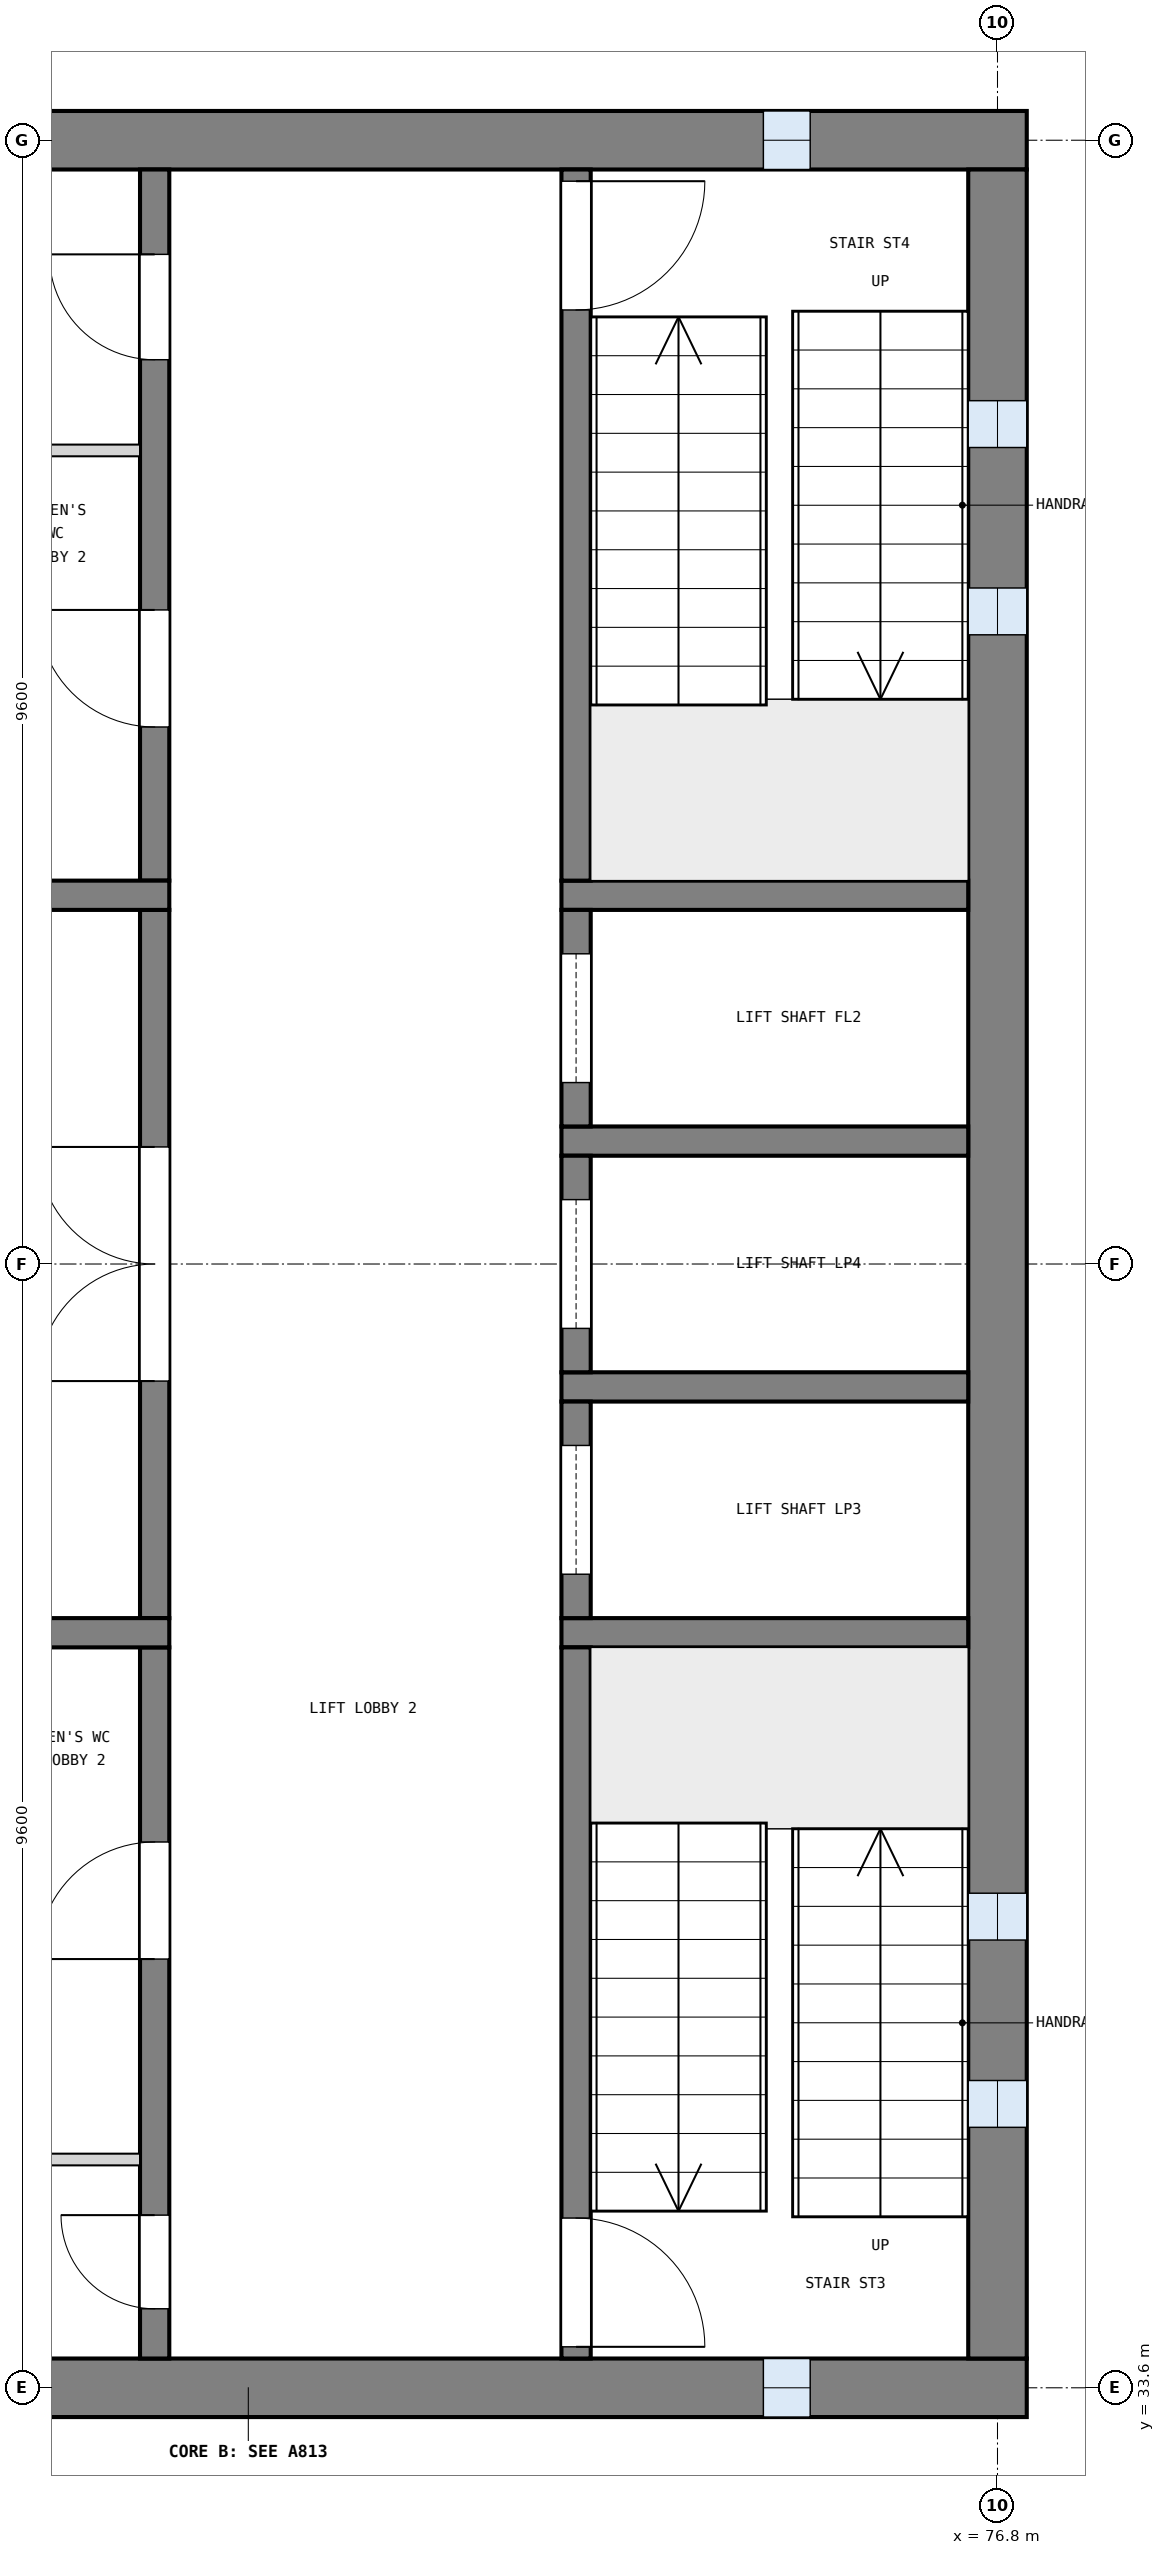
"""IFC4 building model, lengths in metres.
Left out: names, types, materials, properties, quantities, classifications, styles, units other than length and angle.
Written with IfcOpenShell. Run it as: python <this file> out.ifc"""

import sys

from ifc_helpers import new_model, si_unit, direction, frame, frame_2d, origin, place, context, subcontext, project, spatial, rectangle, extrude, element, fill, save


model = new_model("IFC4")
c1 = context("Model", 3, precision=1e-05, world=origin(), true_north=direction((0.0, 1.0)))
c2 = subcontext(c1, "Body", "Model", "MODEL_VIEW")
j1 = project(units=[si_unit("LENGTHUNIT", "METRE"), si_unit("PLANEANGLEUNIT", "RADIAN")], contexts=[c1])
p1 = place(None, origin())
s1 = spatial("IfcSite", under=j1, at=p1, CompositionType="ELEMENT")
p2 = place(p1, origin())
s2 = spatial("IfcBuilding", under=s1, at=p2, CompositionType="ELEMENT")
p3 = place(p2, frame((0.0, 0.0, 44.4)))
s3 = spatial("IfcBuildingStorey", under=s2, at=p3, CompositionType="ELEMENT", Elevation=44.4)
p4 = place(p3, frame((63.75, 52.8, 0.0), z_axis=(0.0, 0.0, 1.0), x_axis=(1.0, 0.0, 0.0)))
e1 = element("IfcWall", 1, at=p4, inside=s3, PredefinedType="SHEAR", context=c2, shape_type="SweptSolid", body=[
    extrude(rectangle(XDim=13.3, YDim=0.5, at=frame_2d((6.65, 0.0))), origin(), (0.0, 0.0, 1.0), 3.9),
])
p5 = place(p4, frame((11.05, 0.0, 1.0)))
e2 = element("IfcOpeningElement", 2, at=p5, cuts=e1, PredefinedType="OPENING", context=c2, shape_type="SweptSolid", body=[
    extrude(rectangle(XDim=0.4, YDim=2.0, at=frame_2d((0.2, 1.0))), frame((0.0, 0.26, 0.0), z_axis=(0.0, -1.0, 0.0), x_axis=(1.0, 0.0, 0.0)), (0.0, 0.0, 1.0), 0.52),
])
p6 = place(p3, frame((63.75, 33.6, 0.0), z_axis=(0.0, 0.0, 1.0), x_axis=(1.0, 0.0, 0.0)))
e3 = element("IfcWall", 3, at=p6, inside=s3, PredefinedType="SHEAR", context=c2, shape_type="SweptSolid", body=[
    extrude(rectangle(XDim=13.3, YDim=0.5, at=frame_2d((6.65, 0.0))), origin(), (0.0, 0.0, 1.0), 3.9),
])
p7 = place(p6, frame((11.05, 0.0, 1.0)))
e4 = element("IfcOpeningElement", 4, at=p7, cuts=e3, PredefinedType="OPENING", context=c2, shape_type="SweptSolid", body=[
    extrude(rectangle(XDim=0.4, YDim=2.0, at=frame_2d((0.2, 1.0))), frame((0.0, 0.26, 0.0), z_axis=(0.0, -1.0, 0.0), x_axis=(1.0, 0.0, 0.0)), (0.0, 0.0, 1.0), 0.52),
])
p8 = place(p3, frame((76.8, 33.85, 0.0), z_axis=(0.0, 0.0, 1.0), x_axis=(0.0, 1.0, 0.0)))
e5 = element("IfcWall", 5, at=p8, inside=s3, PredefinedType="SHEAR", context=c2, shape_type="SweptSolid", body=[
    extrude(rectangle(XDim=18.7, YDim=0.5, at=frame_2d((9.35, 0.0))), origin(), (0.0, 0.0, 1.0), 3.9),
])
p9 = place(p8, frame((1.975, 0.0, 1.0)))
e6 = element("IfcOpeningElement", 6, at=p9, cuts=e5, PredefinedType="OPENING", context=c2, shape_type="SweptSolid", body=[
    extrude(rectangle(XDim=0.4, YDim=2.0, at=frame_2d((0.2, 1.0))), frame((0.0, 0.26, 0.0), z_axis=(0.0, -1.0, 0.0), x_axis=(1.0, 0.0, 0.0)), (0.0, 0.0, 1.0), 0.52),
])
p10 = place(p8, frame((3.575, 0.0, 1.0)))
e7 = element("IfcOpeningElement", 7, at=p10, cuts=e5, PredefinedType="OPENING", context=c2, shape_type="SweptSolid", body=[
    extrude(rectangle(XDim=0.4, YDim=2.0, at=frame_2d((0.2, 1.0))), frame((0.0, 0.26, 0.0), z_axis=(0.0, -1.0, 0.0), x_axis=(1.0, 0.0, 0.0)), (0.0, 0.0, 1.0), 0.52),
])
p11 = place(p8, frame((14.725, 0.0, 1.0)))
e8 = element("IfcOpeningElement", 8, at=p11, cuts=e5, PredefinedType="OPENING", context=c2, shape_type="SweptSolid", body=[
    extrude(rectangle(XDim=0.4, YDim=2.0, at=frame_2d((0.2, 1.0))), frame((0.0, 0.26, 0.0), z_axis=(0.0, -1.0, 0.0), x_axis=(1.0, 0.0, 0.0)), (0.0, 0.0, 1.0), 0.52),
])
p12 = place(p8, frame((16.325, 0.0, 1.0)))
e9 = element("IfcOpeningElement", 9, at=p12, cuts=e5, PredefinedType="OPENING", context=c2, shape_type="SweptSolid", body=[
    extrude(rectangle(XDim=0.4, YDim=2.0, at=frame_2d((0.2, 1.0))), frame((0.0, 0.26, 0.0), z_axis=(0.0, -1.0, 0.0), x_axis=(1.0, 0.0, 0.0)), (0.0, 0.0, 1.0), 0.52),
])
for number, where, z_axis, x_axis in (
    (10, (76.55, 40.05, 0.0), (0.0, 0.0, 1.0), (-1.0, 0.0, 0.0)),
    (11, (76.55, 42.15, 0.0), (0.0, 0.0, 1.0), (-1.0, 0.0, 0.0)),
    (12, (76.55, 44.25, 0.0), (0.0, 0.0, 1.0), (-1.0, 0.0, 0.0)),
    (13, (76.55, 46.35, 0.0), (0.0, 0.0, 1.0), (-1.0, 0.0, 0.0)),
):
    element("IfcWall", number, at=place(p3, frame(where, z_axis=z_axis, x_axis=x_axis)), inside=s3, PredefinedType="SOLIDWALL", context=c2, shape_type="SweptSolid", body=[
        extrude(rectangle(XDim=3.475, YDim=0.25, at=frame_2d((1.738, 0.0))), origin(), (0.0, 0.0, 1.0), 3.6),
    ])
p13 = place(p3, frame((73.2, 33.85, 0.0), z_axis=(0.0, 0.0, 1.0), x_axis=(0.0, 1.0, 0.0)))
e14 = element("IfcWall", 14, at=p13, inside=s3, PredefinedType="SOLIDWALL", context=c2, shape_type="SweptSolid", body=[
    extrude(rectangle(XDim=6.075, YDim=0.25, at=frame_2d((3.038, 0.0))), origin(), (0.0, 0.0, 1.0), 3.6),
])
p14 = place(p13, frame((0.1, 0.0, 0.0)))
e15 = element("IfcOpeningElement", 15, at=p14, cuts=e14, PredefinedType="OPENING", context=c2, shape_type="SweptSolid", body=[
    extrude(rectangle(XDim=1.1, YDim=2.1, at=frame_2d((0.55, 1.05))), frame((0.0, 0.135, 0.0), z_axis=(0.0, -1.0, 0.0), x_axis=(1.0, 0.0, 0.0)), (0.0, 0.0, 1.0), 0.27),
])
p15 = place(p3, frame((73.2, 40.175, 0.0), z_axis=(0.0, 0.0, 1.0), x_axis=(0.0, 1.0, 0.0)))
e16 = element("IfcWall", 16, at=p15, inside=s3, PredefinedType="SOLIDWALL", context=c2, shape_type="SweptSolid", body=[
    extrude(rectangle(XDim=1.85, YDim=0.25, at=frame_2d((0.925, 0.0))), origin(), (0.0, 0.0, 1.0), 3.6),
])
p16 = place(p15, frame((0.375, 0.0, 0.0)))
e17 = element("IfcOpeningElement", 17, at=p16, cuts=e16, PredefinedType="OPENING", context=c2, shape_type="SweptSolid", body=[
    extrude(rectangle(XDim=1.1, YDim=2.1, at=frame_2d((0.55, 1.05))), frame((0.0, 0.135, 0.0), z_axis=(0.0, -1.0, 0.0), x_axis=(1.0, 0.0, 0.0)), (0.0, 0.0, 1.0), 0.27),
])
p17 = place(p3, frame((73.2, 42.275, 0.0), z_axis=(0.0, 0.0, 1.0), x_axis=(0.0, 1.0, 0.0)))
e18 = element("IfcWall", 18, at=p17, inside=s3, PredefinedType="SOLIDWALL", context=c2, shape_type="SweptSolid", body=[
    extrude(rectangle(XDim=1.85, YDim=0.25, at=frame_2d((0.925, 0.0))), origin(), (0.0, 0.0, 1.0), 3.6),
])
p18 = place(p17, frame((0.375, 0.0, 0.0)))
e19 = element("IfcOpeningElement", 19, at=p18, cuts=e18, PredefinedType="OPENING", context=c2, shape_type="SweptSolid", body=[
    extrude(rectangle(XDim=1.1, YDim=2.1, at=frame_2d((0.55, 1.05))), frame((0.0, 0.135, 0.0), z_axis=(0.0, -1.0, 0.0), x_axis=(1.0, 0.0, 0.0)), (0.0, 0.0, 1.0), 0.27),
])
p19 = place(p3, frame((73.2, 44.375, 0.0), z_axis=(0.0, 0.0, 1.0), x_axis=(0.0, 1.0, 0.0)))
e20 = element("IfcWall", 20, at=p19, inside=s3, PredefinedType="SOLIDWALL", context=c2, shape_type="SweptSolid", body=[
    extrude(rectangle(XDim=1.85, YDim=0.25, at=frame_2d((0.925, 0.0))), origin(), (0.0, 0.0, 1.0), 3.6),
])
p20 = place(p19, frame((0.375, 0.0, 0.0)))
e21 = element("IfcOpeningElement", 21, at=p20, cuts=e20, PredefinedType="OPENING", context=c2, shape_type="SweptSolid", body=[
    extrude(rectangle(XDim=1.1, YDim=2.1, at=frame_2d((0.55, 1.05))), frame((0.0, 0.135, 0.0), z_axis=(0.0, -1.0, 0.0), x_axis=(1.0, 0.0, 0.0)), (0.0, 0.0, 1.0), 0.27),
])
p21 = place(p3, frame((73.2, 46.475, 0.0), z_axis=(0.0, 0.0, 1.0), x_axis=(0.0, 1.0, 0.0)))
e22 = element("IfcWall", 22, at=p21, inside=s3, PredefinedType="SOLIDWALL", context=c2, shape_type="SweptSolid", body=[
    extrude(rectangle(XDim=6.075, YDim=0.25, at=frame_2d((3.038, 0.0))), origin(), (0.0, 0.0, 1.0), 3.6),
])
p22 = place(p21, frame((4.875, 0.0, 0.0)))
e23 = element("IfcOpeningElement", 23, at=p22, cuts=e22, PredefinedType="OPENING", context=c2, shape_type="SweptSolid", body=[
    extrude(rectangle(XDim=1.1, YDim=2.1, at=frame_2d((0.55, 1.05))), frame((0.0, 0.135, 0.0), z_axis=(0.0, -1.0, 0.0), x_axis=(1.0, 0.0, 0.0)), (0.0, 0.0, 1.0), 0.27),
])
p23 = place(p3, frame((69.6, 33.85, 0.0), z_axis=(0.0, 0.0, 1.0), x_axis=(0.0, 1.0, 0.0)))
e24 = element("IfcWall", 24, at=p23, inside=s3, PredefinedType="SOLIDWALL", context=c2, shape_type="SweptSolid", body=[
    extrude(rectangle(XDim=6.075, YDim=0.25, at=frame_2d((3.038, 0.0))), origin(), (0.0, 0.0, 1.0), 3.6),
])
p24 = place(p23, frame((0.425, 0.0, 0.0)))
e25 = element("IfcOpeningElement", 25, at=p24, cuts=e24, PredefinedType="OPENING", context=c2, shape_type="SweptSolid", body=[
    extrude(rectangle(XDim=0.8, YDim=2.1, at=frame_2d((0.4, 1.05))), frame((0.0, 0.135, 0.0), z_axis=(0.0, -1.0, 0.0), x_axis=(1.0, 0.0, 0.0)), (0.0, 0.0, 1.0), 0.27),
])
p25 = place(p23, frame((3.413, 0.0, 0.0)))
e26 = element("IfcOpeningElement", 26, at=p25, cuts=e24, PredefinedType="OPENING", context=c2, shape_type="SweptSolid", body=[
    extrude(rectangle(XDim=1.0, YDim=2.1, at=frame_2d((0.5, 1.05))), frame((0.0, 0.135, 0.0), z_axis=(0.0, -1.0, 0.0), x_axis=(1.0, 0.0, 0.0)), (0.0, 0.0, 1.0), 0.27),
])
p26 = place(p3, frame((69.6, 40.175, 0.0), z_axis=(0.0, 0.0, 1.0), x_axis=(0.0, 1.0, 0.0)))
e27 = element("IfcWall", 27, at=p26, inside=s3, PredefinedType="SOLIDWALL", context=c2, shape_type="SweptSolid", body=[
    extrude(rectangle(XDim=6.05, YDim=0.25, at=frame_2d((3.025, 0.0))), origin(), (0.0, 0.0, 1.0), 3.6),
])
p27 = place(p26, frame((2.025, 0.0, 0.0)))
e28 = element("IfcOpeningElement", 28, at=p27, cuts=e27, PredefinedType="OPENING", context=c2, shape_type="SweptSolid", body=[
    extrude(rectangle(XDim=2.0, YDim=2.1, at=frame_2d((1.0, 1.05))), frame((0.0, 0.135, 0.0), z_axis=(0.0, -1.0, 0.0), x_axis=(1.0, 0.0, 0.0)), (0.0, 0.0, 1.0), 0.27),
])
p28 = place(p3, frame((69.6, 46.475, 0.0), z_axis=(0.0, 0.0, 1.0), x_axis=(0.0, 1.0, 0.0)))
e29 = element("IfcWall", 29, at=p28, inside=s3, PredefinedType="SOLIDWALL", context=c2, shape_type="SweptSolid", body=[
    extrude(rectangle(XDim=6.075, YDim=0.25, at=frame_2d((3.038, 0.0))), origin(), (0.0, 0.0, 1.0), 3.6),
])
p29 = place(p28, frame((1.312, 0.0, 0.0)))
e30 = element("IfcOpeningElement", 30, at=p29, cuts=e29, PredefinedType="OPENING", context=c2, shape_type="SweptSolid", body=[
    extrude(rectangle(XDim=1.0, YDim=2.1, at=frame_2d((0.5, 1.05))), frame((0.0, 0.135, 0.0), z_axis=(0.0, -1.0, 0.0), x_axis=(1.0, 0.0, 0.0)), (0.0, 0.0, 1.0), 0.27),
])
p30 = place(p28, frame((4.45, 0.0, 0.0)))
e31 = element("IfcOpeningElement", 31, at=p30, cuts=e29, PredefinedType="OPENING", context=c2, shape_type="SweptSolid", body=[
    extrude(rectangle(XDim=0.9, YDim=2.1, at=frame_2d((0.45, 1.05))), frame((0.0, 0.135, 0.0), z_axis=(0.0, -1.0, 0.0), x_axis=(1.0, 0.0, 0.0)), (0.0, 0.0, 1.0), 0.27),
])
for number, where, z_axis, x_axis in (
    (32, (69.725, 40.05, 0.0), (0.0, 0.0, 1.0), (-1.0, 0.0, 0.0)),
    (33, (69.725, 46.35, 0.0), (0.0, 0.0, 1.0), (-1.0, 0.0, 0.0)),
):
    element("IfcWall", number, at=place(p3, frame(where, z_axis=z_axis, x_axis=x_axis)), inside=s3, PredefinedType="SOLIDWALL", context=c2, shape_type="SweptSolid", body=[
        extrude(rectangle(XDim=5.475, YDim=0.25, at=frame_2d((2.738, 0.0))), origin(), (0.0, 0.0, 1.0), 3.6),
    ])
for number, where, z_axis, x_axis in (
    (34, (69.475, 35.55, 0.0), (0.0, 0.0, 1.0), (-1.0, 0.0, 0.0)),
    (35, (69.475, 50.15, 0.0), (0.0, 0.0, 1.0), (-1.0, 0.0, 0.0)),
):
    element("IfcWall", number, at=place(p3, frame(where, z_axis=z_axis, x_axis=x_axis)), inside=s3, PredefinedType="PARTITIONING", context=c2, shape_type="SweptSolid", body=[
        extrude(rectangle(XDim=5.225, YDim=0.1, at=frame_2d((2.613, 0.0))), origin(), (0.0, 0.0, 1.0), 3.6),
    ])
p31 = place(p9, origin())
e36 = element("IfcWindow", 36, at=p31, inside=s3, PartitioningType="SINGLE_PANEL", PredefinedType="WINDOW", context=c2, shape_type="SweptSolid", body=[
    extrude(rectangle(XDim=0.4, YDim=2.0, at=frame_2d((0.2, 1.0))), frame((0.0, 0.03, 0.0), z_axis=(0.0, -1.0, 0.0), x_axis=(1.0, 0.0, 0.0)), (0.0, 0.0, 1.0), 0.06),
])
fill(e6, e36)
p32 = place(p10, origin())
e37 = element("IfcWindow", 37, at=p32, inside=s3, PartitioningType="SINGLE_PANEL", PredefinedType="WINDOW", context=c2, shape_type="SweptSolid", body=[
    extrude(rectangle(XDim=0.4, YDim=2.0, at=frame_2d((0.2, 1.0))), frame((0.0, 0.03, 0.0), z_axis=(0.0, -1.0, 0.0), x_axis=(1.0, 0.0, 0.0)), (0.0, 0.0, 1.0), 0.06),
])
fill(e7, e37)
p33 = place(p11, origin())
e38 = element("IfcWindow", 38, at=p33, inside=s3, PartitioningType="SINGLE_PANEL", PredefinedType="WINDOW", context=c2, shape_type="SweptSolid", body=[
    extrude(rectangle(XDim=0.4, YDim=2.0, at=frame_2d((0.2, 1.0))), frame((0.0, 0.03, 0.0), z_axis=(0.0, -1.0, 0.0), x_axis=(1.0, 0.0, 0.0)), (0.0, 0.0, 1.0), 0.06),
])
fill(e8, e38)
p34 = place(p12, origin())
e39 = element("IfcWindow", 39, at=p34, inside=s3, PartitioningType="SINGLE_PANEL", PredefinedType="WINDOW", context=c2, shape_type="SweptSolid", body=[
    extrude(rectangle(XDim=0.4, YDim=2.0, at=frame_2d((0.2, 1.0))), frame((0.0, 0.03, 0.0), z_axis=(0.0, -1.0, 0.0), x_axis=(1.0, 0.0, 0.0)), (0.0, 0.0, 1.0), 0.06),
])
fill(e9, e39)
p35 = place(p7, origin())
e40 = element("IfcWindow", 40, at=p35, inside=s3, PartitioningType="SINGLE_PANEL", PredefinedType="WINDOW", context=c2, shape_type="SweptSolid", body=[
    extrude(rectangle(XDim=0.4, YDim=2.0, at=frame_2d((0.2, 1.0))), frame((0.0, 0.03, 0.0), z_axis=(0.0, -1.0, 0.0), x_axis=(1.0, 0.0, 0.0)), (0.0, 0.0, 1.0), 0.06),
])
fill(e4, e40)
p36 = place(p5, origin())
e41 = element("IfcWindow", 41, at=p36, inside=s3, PartitioningType="SINGLE_PANEL", PredefinedType="WINDOW", context=c2, shape_type="SweptSolid", body=[
    extrude(rectangle(XDim=0.4, YDim=2.0, at=frame_2d((0.2, 1.0))), frame((0.0, 0.03, 0.0), z_axis=(0.0, -1.0, 0.0), x_axis=(1.0, 0.0, 0.0)), (0.0, 0.0, 1.0), 0.06),
])
fill(e2, e41)
p37 = place(p14, frame((1.1, 0.0, 0.0), z_axis=(0.0, 0.0, 1.0), x_axis=(-1.0, 0.0, 0.0)))
e42 = element("IfcDoor", 42, at=p37, inside=s3, OperationType="SINGLE_SWING_RIGHT", PredefinedType="DOOR", context=c2, shape_type="SweptSolid", body=[
    extrude(rectangle(XDim=1.1, YDim=2.1, at=frame_2d((0.55, 1.05))), frame((0.0, 0.025, 0.0), z_axis=(0.0, -1.0, 0.0), x_axis=(1.0, 0.0, 0.0)), (0.0, 0.0, 1.0), 0.05),
])
fill(e15, e42)
p38 = place(p22, frame((1.1, 0.0, 0.0), z_axis=(0.0, 0.0, 1.0), x_axis=(-1.0, 0.0, 0.0)))
e43 = element("IfcDoor", 43, at=p38, inside=s3, OperationType="SINGLE_SWING_LEFT", PredefinedType="DOOR", context=c2, shape_type="SweptSolid", body=[
    extrude(rectangle(XDim=1.1, YDim=2.1, at=frame_2d((0.55, 1.05))), frame((0.0, 0.025, 0.0), z_axis=(0.0, -1.0, 0.0), x_axis=(1.0, 0.0, 0.0)), (0.0, 0.0, 1.0), 0.05),
])
fill(e23, e43)
p39 = place(p16, origin())
e44 = element("IfcDoor", 44, at=p39, inside=s3, OperationType="SLIDING_TO_LEFT", PredefinedType="DOOR", context=c2, shape_type="SweptSolid", body=[
    extrude(rectangle(XDim=1.1, YDim=2.1, at=frame_2d((0.55, 1.05))), frame((0.0, 0.025, 0.0), z_axis=(0.0, -1.0, 0.0), x_axis=(1.0, 0.0, 0.0)), (0.0, 0.0, 1.0), 0.05),
])
fill(e17, e44)
p40 = place(p18, origin())
e45 = element("IfcDoor", 45, at=p40, inside=s3, OperationType="SLIDING_TO_LEFT", PredefinedType="DOOR", context=c2, shape_type="SweptSolid", body=[
    extrude(rectangle(XDim=1.1, YDim=2.1, at=frame_2d((0.55, 1.05))), frame((0.0, 0.025, 0.0), z_axis=(0.0, -1.0, 0.0), x_axis=(1.0, 0.0, 0.0)), (0.0, 0.0, 1.0), 0.05),
])
fill(e19, e45)
p41 = place(p20, origin())
e46 = element("IfcDoor", 46, at=p41, inside=s3, OperationType="SLIDING_TO_LEFT", PredefinedType="DOOR", context=c2, shape_type="SweptSolid", body=[
    extrude(rectangle(XDim=1.1, YDim=2.1, at=frame_2d((0.55, 1.05))), frame((0.0, 0.025, 0.0), z_axis=(0.0, -1.0, 0.0), x_axis=(1.0, 0.0, 0.0)), (0.0, 0.0, 1.0), 0.05),
])
fill(e21, e46)
p42 = place(p27, origin())
e47 = element("IfcDoor", 47, at=p42, inside=s3, OperationType="DOUBLE_DOOR_SINGLE_SWING", PredefinedType="DOOR", context=c2, shape_type="SweptSolid", body=[
    extrude(rectangle(XDim=2.0, YDim=2.1, at=frame_2d((1.0, 1.05))), frame((0.0, 0.025, 0.0), z_axis=(0.0, -1.0, 0.0), x_axis=(1.0, 0.0, 0.0)), (0.0, 0.0, 1.0), 0.05),
])
fill(e28, e47)
p43 = place(p24, origin())
e48 = element("IfcDoor", 48, at=p43, inside=s3, OperationType="SINGLE_SWING_RIGHT", PredefinedType="DOOR", context=c2, shape_type="SweptSolid", body=[
    extrude(rectangle(XDim=0.8, YDim=2.1, at=frame_2d((0.4, 1.05))), frame((0.0, 0.025, 0.0), z_axis=(0.0, -1.0, 0.0), x_axis=(1.0, 0.0, 0.0)), (0.0, 0.0, 1.0), 0.05),
])
fill(e25, e48)
p44 = place(p25, origin())
e49 = element("IfcDoor", 49, at=p44, inside=s3, OperationType="SINGLE_SWING_LEFT", PredefinedType="DOOR", context=c2, shape_type="SweptSolid", body=[
    extrude(rectangle(XDim=1.0, YDim=2.1, at=frame_2d((0.5, 1.05))), frame((0.0, 0.025, 0.0), z_axis=(0.0, -1.0, 0.0), x_axis=(1.0, 0.0, 0.0)), (0.0, 0.0, 1.0), 0.05),
])
fill(e26, e49)
p45 = place(p29, origin())
e50 = element("IfcDoor", 50, at=p45, inside=s3, OperationType="SINGLE_SWING_RIGHT", PredefinedType="DOOR", context=c2, shape_type="SweptSolid", body=[
    extrude(rectangle(XDim=1.0, YDim=2.1, at=frame_2d((0.5, 1.05))), frame((0.0, 0.025, 0.0), z_axis=(0.0, -1.0, 0.0), x_axis=(1.0, 0.0, 0.0)), (0.0, 0.0, 1.0), 0.05),
])
fill(e30, e50)
p46 = place(p30, origin())
e51 = element("IfcDoor", 51, at=p46, inside=s3, OperationType="SINGLE_SWING_RIGHT", PredefinedType="DOOR", context=c2, shape_type="SweptSolid", body=[
    extrude(rectangle(XDim=0.9, YDim=2.1, at=frame_2d((0.45, 1.05))), frame((0.0, 0.025, 0.0), z_axis=(0.0, -1.0, 0.0), x_axis=(1.0, 0.0, 0.0)), (0.0, 0.0, 1.0), 0.05),
])
fill(e31, e51)
save(model, sys.argv[1])
